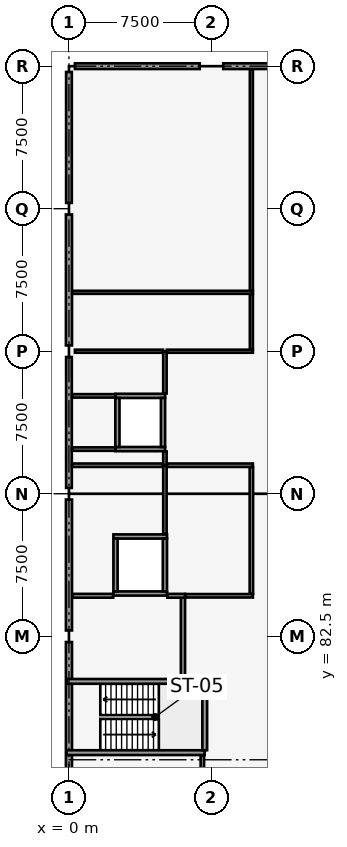
"""IFC4 building model, lengths in metres.
Left out: names, types, materials, properties, quantities, classifications, styles, units other than length and angle.
Written with IfcOpenShell. Run it as: python <this file> out.ifc"""

import sys

from ifc_helpers import new_model, si_unit, direction, frame, frame_2d, origin, origin_2d, place, context, subcontext, project, spatial, rectangle, extrude, element, fill, save


model = new_model("IFC4")
c1 = context("Model", 3, precision=1e-05, world=origin(), true_north=direction((0.0, 1.0)))
c2 = subcontext(c1, "Body", "Model", "MODEL_VIEW")
j1 = project(units=[si_unit("LENGTHUNIT", "METRE"), si_unit("PLANEANGLEUNIT", "RADIAN")], contexts=[c1])
p1 = place(None, origin())
s1 = spatial("IfcSite", under=j1, at=p1, CompositionType="ELEMENT")
p2 = place(p1, origin())
s2 = spatial("IfcBuilding", under=s1, at=p2, CompositionType="ELEMENT")
p3 = place(p2, frame((0.0, 0.0, 9.0)))
s3 = spatial("IfcBuildingStorey", under=s2, at=p3, CompositionType="ELEMENT", Elevation=9.0)
for number, where, z_axis, x_axis in (
    (1, (0.0, 82.5, 0.0), (0.0, 0.0, 1.0), (1.0, 0.0, 0.0)),
    (2, (0.0, 90.0, 0.0), (0.0, 0.0, 1.0), (1.0, 0.0, 0.0)),
    (3, (0.0, 97.5, 0.0), (0.0, 0.0, 1.0), (1.0, 0.0, 0.0)),
    (4, (0.0, 105.0, 0.0), (0.0, 0.0, 1.0), (1.0, 0.0, 0.0)),
    (5, (0.0, 112.5, 0.0), (0.0, 0.0, 1.0), (1.0, 0.0, 0.0)),
):
    element("IfcColumn", number, at=place(p3, frame(where, z_axis=z_axis, x_axis=x_axis)), inside=s3, PredefinedType="COLUMN", context=c2, shape_type="SweptSolid", body=[
        extrude(rectangle(XDim=0.6, YDim=0.6, at=origin_2d()), origin(), (0.0, 0.0, 1.0), 4.2),
    ])
p4 = place(p3, frame((0.315, 112.5, 0.0), z_axis=(0.0, 0.0, 1.0), x_axis=(1.0, 0.0, 0.0)))
e6 = element("IfcWall", 6, at=p4, inside=s3, PredefinedType="SOLIDWALL", context=c2, shape_type="SweptSolid", body=[
    extrude(rectangle(XDim=6.565, YDim=0.3, at=frame_2d((3.282, 0.0))), origin(), (0.0, 0.0, 1.0), 2.87),
])
p5 = place(p4, frame((2.585, 0.0, 0.6)))
e7 = element("IfcOpeningElement", 7, at=p5, cuts=e6, PredefinedType="OPENING", context=c2, shape_type="SweptSolid", body=[
    extrude(rectangle(XDim=1.7, YDim=1.8, at=frame_2d((0.85, 0.9))), frame((0.0, 0.16, 0.0), z_axis=(0.0, -1.0, 0.0), x_axis=(1.0, 0.0, 0.0)), (0.0, 0.0, 1.0), 0.32),
])
p6 = place(p3, frame((8.12, 112.5, 0.0), z_axis=(0.0, 0.0, 1.0), x_axis=(1.0, 0.0, 0.0)))
e8 = element("IfcWall", 8, at=p6, inside=s3, PredefinedType="SOLIDWALL", context=c2, shape_type="SweptSolid", body=[
    extrude(rectangle(XDim=6.565, YDim=0.3, at=frame_2d((3.282, 0.0))), origin(), (0.0, 0.0, 1.0), 2.87),
])
p7 = place(p6, frame((2.205, 0.0, 0.6)))
e9 = element("IfcOpeningElement", 9, at=p7, cuts=e8, PredefinedType="OPENING", context=c2, shape_type="SweptSolid", body=[
    extrude(rectangle(XDim=1.85, YDim=1.8, at=frame_2d((0.925, 0.9))), frame((0.0, 0.16, 0.0), z_axis=(0.0, -1.0, 0.0), x_axis=(1.0, 0.0, 0.0)), (0.0, 0.0, 1.0), 0.32),
])
for number, where, z_axis, x_axis in (
    (10, (0.0, 75.305, 0.0), (0.0, 0.0, 1.0), (0.0, 1.0, 0.0)),
    (11, (0.0, 82.805, 0.0), (0.0, 0.0, 1.0), (0.0, 1.0, 0.0)),
):
    element("IfcWall", number, at=place(p3, frame(where, z_axis=z_axis, x_axis=x_axis)), inside=s3, PredefinedType="SOLIDWALL", context=c2, shape_type="SweptSolid", body=[
        extrude(rectangle(XDim=6.89, YDim=0.32, at=frame_2d((3.445, 0.0))), origin(), (0.0, 0.0, 1.0), 2.87),
    ])
p8 = place(p3, frame((0.0, 90.305, 0.0), z_axis=(0.0, 0.0, 1.0), x_axis=(0.0, 1.0, 0.0)))
e12 = element("IfcWall", 12, at=p8, inside=s3, PredefinedType="SOLIDWALL", context=c2, shape_type="SweptSolid", body=[
    extrude(rectangle(XDim=6.89, YDim=0.3, at=frame_2d((3.445, 0.0))), origin(), (0.0, 0.0, 1.0), 2.87),
])
p9 = place(p8, frame((2.87, 0.0, 0.6)))
e13 = element("IfcOpeningElement", 13, at=p9, cuts=e12, PredefinedType="OPENING", context=c2, shape_type="SweptSolid", body=[
    extrude(rectangle(XDim=1.15, YDim=1.3, at=frame_2d((0.575, 0.65))), frame((0.0, 0.16, 0.0), z_axis=(0.0, -1.0, 0.0), x_axis=(1.0, 0.0, 0.0)), (0.0, 0.0, 1.0), 0.32),
])
p10 = place(p3, frame((0.0, 97.805, 0.0), z_axis=(0.0, 0.0, 1.0), x_axis=(0.0, 1.0, 0.0)))
e14 = element("IfcWall", 14, at=p10, inside=s3, PredefinedType="SOLIDWALL", context=c2, shape_type="SweptSolid", body=[
    extrude(rectangle(XDim=6.89, YDim=0.32, at=frame_2d((3.445, 0.0))), origin(), (0.0, 0.0, 1.0), 2.87),
])
p11 = place(p3, frame((0.0, 105.305, 0.0), z_axis=(0.0, 0.0, 1.0), x_axis=(0.0, 1.0, 0.0)))
e15 = element("IfcWall", 15, at=p11, inside=s3, PredefinedType="SOLIDWALL", context=c2, shape_type="SweptSolid", body=[
    extrude(rectangle(XDim=6.89, YDim=0.3, at=frame_2d((3.445, 0.0))), origin(), (0.0, 0.0, 1.0), 2.87),
])
p12 = place(p11, frame((1.155, 0.0, 0.6)))
e16 = element("IfcOpeningElement", 16, at=p12, cuts=e15, PredefinedType="OPENING", context=c2, shape_type="SweptSolid", body=[
    extrude(rectangle(XDim=1.45, YDim=1.3, at=frame_2d((0.725, 0.65))), frame((0.0, 0.16, 0.0), z_axis=(0.0, -1.0, 0.0), x_axis=(1.0, 0.0, 0.0)), (0.0, 0.0, 1.0), 0.32),
])
p13 = place(p11, frame((4.41, 0.0, 0.6)))
e17 = element("IfcOpeningElement", 17, at=p13, cuts=e15, PredefinedType="OPENING", context=c2, shape_type="SweptSolid", body=[
    extrude(rectangle(XDim=1.2, YDim=1.2, at=frame_2d((0.6, 0.6))), frame((0.0, 0.16, 0.0), z_axis=(0.0, -1.0, 0.0), x_axis=(1.0, 0.0, 0.0)), (0.0, 0.0, 1.0), 0.32),
])
p14 = place(p3, frame((-0.12, 76.375, 0.0), z_axis=(0.0, 0.0, 1.0), x_axis=(1.0, 0.0, 0.0)))
e18 = element("IfcWall", 18, at=p14, inside=s3, PredefinedType="SOLIDWALL", context=c2, shape_type="SweptSolid", body=[
    extrude(rectangle(XDim=7.26, YDim=0.25, at=frame_2d((3.63, 0.0))), origin(), (0.0, 0.0, 1.0), 3.92),
])
p15 = place(p3, frame((-0.12, 80.125, 0.0), z_axis=(0.0, 0.0, 1.0), x_axis=(1.0, 0.0, 0.0)))
e19 = element("IfcWall", 19, at=p15, inside=s3, PredefinedType="SOLIDWALL", context=c2, shape_type="SweptSolid", body=[
    extrude(rectangle(XDim=7.26, YDim=0.25, at=frame_2d((3.63, 0.0))), origin(), (0.0, 0.0, 1.0), 3.92),
])
p16 = place(p15, frame((0.45, 0.0, 0.0)))
e20 = element("IfcOpeningElement", 20, at=p16, cuts=e19, PredefinedType="OPENING", context=c2, shape_type="SweptSolid", body=[
    extrude(rectangle(XDim=1.1, YDim=2.15, at=frame_2d((0.55, 1.075))), frame((0.0, 0.135, 0.0), z_axis=(0.0, -1.0, 0.0), x_axis=(1.0, 0.0, 0.0)), (0.0, 0.0, 1.0), 0.27),
])
p17 = place(p3, frame((7.145, 76.5, 0.0), z_axis=(0.0, 0.0, 1.0), x_axis=(0.0, 1.0, 0.0)))
e21 = element("IfcWall", 21, at=p17, inside=s3, PredefinedType="SOLIDWALL", context=c2, shape_type="SweptSolid", body=[
    extrude(rectangle(XDim=3.5, YDim=0.25, at=frame_2d((1.75, 0.0))), origin(), (0.0, 0.0, 1.0), 3.92),
])
for number, where, z_axis, x_axis in (
    (22, (2.44, 92.35, 0.0), (0.0, 0.0, 1.0), (1.0, 0.0, 0.0)),
    (23, (2.44, 95.15, 0.0), (0.0, 0.0, 1.0), (1.0, 0.0, 0.0)),
):
    element("IfcWall", number, at=place(p3, frame(where, z_axis=z_axis, x_axis=x_axis)), inside=s3, PredefinedType="SOLIDWALL", context=c2, shape_type="SweptSolid", body=[
        extrude(rectangle(XDim=2.62, YDim=0.22, at=frame_2d((1.31, 0.0))), origin(), (0.0, 0.0, 1.0), 3.92),
    ])
p18 = place(p3, frame((2.55, 92.46, 0.0), z_axis=(0.0, 0.0, 1.0), x_axis=(0.0, 1.0, 0.0)))
e24 = element("IfcWall", 24, at=p18, inside=s3, PredefinedType="SOLIDWALL", context=c2, shape_type="SweptSolid", body=[
    extrude(rectangle(XDim=2.58, YDim=0.22, at=frame_2d((1.29, 0.0))), origin(), (0.0, 0.0, 1.0), 3.92),
])
p19 = place(p3, frame((4.95, 92.46, 0.0), z_axis=(0.0, 0.0, 1.0), x_axis=(0.0, 1.0, 0.0)))
e25 = element("IfcWall", 25, at=p19, inside=s3, PredefinedType="SOLIDWALL", context=c2, shape_type="SweptSolid", body=[
    extrude(rectangle(XDim=2.58, YDim=0.22, at=frame_2d((1.29, 0.0))), origin(), (0.0, 0.0, 1.0), 3.92),
])
p20 = place(p19, frame((0.79, 0.0, 0.0)))
e26 = element("IfcOpeningElement", 26, at=p20, cuts=e25, PredefinedType="OPENING", context=c2, shape_type="SweptSolid", body=[
    extrude(rectangle(XDim=1.0, YDim=2.15, at=frame_2d((0.5, 1.075))), frame((0.0, 0.12, 0.0), z_axis=(0.0, -1.0, 0.0), x_axis=(1.0, 0.0, 0.0)), (0.0, 0.0, 1.0), 0.24),
])
p21 = place(p3, frame((2.34, 84.75, 0.0), z_axis=(0.0, 0.0, 1.0), x_axis=(1.0, 0.0, 0.0)))
e27 = element("IfcWall", 27, at=p21, inside=s3, PredefinedType="SOLIDWALL", context=c2, shape_type="SweptSolid", body=[
    extrude(rectangle(XDim=2.82, YDim=0.22, at=frame_2d((1.41, 0.0))), origin(), (0.0, 0.0, 1.0), 3.92),
])
p22 = place(p21, frame((0.86, 0.0, 0.0)))
e28 = element("IfcOpeningElement", 28, at=p22, cuts=e27, PredefinedType="OPENING", context=c2, shape_type="SweptSolid", body=[
    extrude(rectangle(XDim=1.1, YDim=2.15, at=frame_2d((0.55, 1.075))), frame((0.0, 0.12, 0.0), z_axis=(0.0, -1.0, 0.0), x_axis=(1.0, 0.0, 0.0)), (0.0, 0.0, 1.0), 0.24),
])
p23 = place(p3, frame((2.34, 87.75, 0.0), z_axis=(0.0, 0.0, 1.0), x_axis=(1.0, 0.0, 0.0)))
e29 = element("IfcWall", 29, at=p23, inside=s3, PredefinedType="SOLIDWALL", context=c2, shape_type="SweptSolid", body=[
    extrude(rectangle(XDim=2.82, YDim=0.22, at=frame_2d((1.41, 0.0))), origin(), (0.0, 0.0, 1.0), 3.92),
])
for number, where, z_axis, x_axis in (
    (30, (2.45, 84.86, 0.0), (0.0, 0.0, 1.0), (0.0, 1.0, 0.0)),
    (31, (5.05, 84.86, 0.0), (0.0, 0.0, 1.0), (0.0, 1.0, 0.0)),
):
    element("IfcWall", number, at=place(p3, frame(where, z_axis=z_axis, x_axis=x_axis)), inside=s3, PredefinedType="SOLIDWALL", context=c2, shape_type="SweptSolid", body=[
        extrude(rectangle(XDim=2.78, YDim=0.22, at=frame_2d((1.39, 0.0))), origin(), (0.0, 0.0, 1.0), 3.92),
    ])
p24 = place(p3, frame((6.0, 80.26, 0.0), z_axis=(0.0, 0.0, 1.0), x_axis=(0.0, 1.0, 0.0)))
e32 = element("IfcWall", 32, at=p24, inside=s3, PredefinedType="SOLIDWALL", context=c2, shape_type="SweptSolid", body=[
    extrude(rectangle(XDim=4.37, YDim=0.22, at=frame_2d((2.185, 0.0))), origin(), (0.0, 0.0, 1.0), 3.92),
])
p25 = place(p24, frame((0.45, 0.0, 0.0)))
e33 = element("IfcOpeningElement", 33, at=p25, cuts=e32, PredefinedType="OPENING", context=c2, shape_type="SweptSolid", body=[
    extrude(rectangle(XDim=1.1, YDim=2.15, at=frame_2d((0.55, 1.075))), frame((0.0, 0.12, 0.0), z_axis=(0.0, -1.0, 0.0), x_axis=(1.0, 0.0, 0.0)), (0.0, 0.0, 1.0), 0.24),
])
p26 = place(p3, frame((0.18, 84.63, 0.0), z_axis=(0.0, 0.0, 1.0), x_axis=(1.0, 0.0, 0.0)))
e34 = element("IfcWall", 34, at=p26, inside=s3, PredefinedType="PARTITIONING", context=c2, shape_type="SweptSolid", body=[
    extrude(rectangle(XDim=2.145, YDim=0.2, at=frame_2d((1.073, 0.0))), origin(), (0.0, 0.0, 1.0), 3.28),
])
p27 = place(p3, frame((5.175, 84.63, 0.0), z_axis=(0.0, 0.0, 1.0), x_axis=(1.0, 0.0, 0.0)))
e35 = element("IfcWall", 35, at=p27, inside=s3, PredefinedType="PARTITIONING", context=c2, shape_type="SweptSolid", body=[
    extrude(rectangle(XDim=0.935, YDim=0.2, at=frame_2d((0.468, 0.0))), origin(), (0.0, 0.0, 1.0), 3.33),
])
p28 = place(p3, frame((7.02, 75.0, 0.0), z_axis=(0.0, 0.0, 1.0), x_axis=(0.0, 1.0, 0.0)))
e36 = element("IfcWall", 36, at=p28, inside=s3, PredefinedType="PARTITIONING", context=c2, shape_type="SweptSolid", body=[
    extrude(rectangle(XDim=1.236, YDim=0.18, at=frame_2d((0.618, 0.0))), origin(), (0.0, 0.0, 1.0), 2.87),
])
p29 = place(p3, frame((5.05, 87.874, 0.0), z_axis=(0.0, 0.0, 1.0), x_axis=(0.0, 1.0, 0.0)))
e37 = element("IfcWall", 37, at=p29, inside=s3, PredefinedType="PARTITIONING", context=c2, shape_type="SweptSolid", body=[
    extrude(rectangle(XDim=3.626, YDim=0.18, at=frame_2d((1.813, 0.0))), origin(), (0.0, 0.0, 1.0), 2.87),
])
p30 = place(p3, frame((6.124, 84.63, 0.0), z_axis=(0.0, 0.0, 1.0), x_axis=(1.0, 0.0, 0.0)))
e38 = element("IfcWall", 38, at=p30, inside=s3, PredefinedType="PARTITIONING", context=c2, shape_type="SweptSolid", body=[
    extrude(rectangle(XDim=3.556, YDim=0.18, at=frame_2d((1.778, 0.0))), origin(), (0.0, 0.0, 1.0), 3.27),
])
p31 = place(p3, frame((0.164, 91.5, 0.0), z_axis=(0.0, 0.0, 1.0), x_axis=(1.0, 0.0, 0.0)))
e39 = element("IfcWall", 39, at=p31, inside=s3, PredefinedType="PARTITIONING", context=c2, shape_type="SweptSolid", body=[
    extrude(rectangle(XDim=4.782, YDim=0.18, at=frame_2d((2.391, 0.0))), origin(), (0.0, 0.0, 1.0), 3.12),
])
p32 = place(p3, frame((5.154, 91.5, 0.0), z_axis=(0.0, 0.0, 1.0), x_axis=(1.0, 0.0, 0.0)))
e40 = element("IfcWall", 40, at=p32, inside=s3, PredefinedType="PARTITIONING", context=c2, shape_type="SweptSolid", body=[
    extrude(rectangle(XDim=4.526, YDim=0.18, at=frame_2d((2.263, 0.0))), origin(), (0.0, 0.0, 1.0), 3.27),
])
p33 = place(p3, frame((9.6, 84.734, 0.0), z_axis=(0.0, 0.0, 1.0), x_axis=(0.0, 1.0, 0.0)))
e41 = element("IfcWall", 41, at=p33, inside=s3, PredefinedType="PARTITIONING", context=c2, shape_type="SweptSolid", body=[
    extrude(rectangle(XDim=6.662, YDim=0.18, at=frame_2d((3.331, 0.0))), origin(), (0.0, 0.0, 1.0), 2.87),
])
p34 = place(p33, frame((2.241, 0.0, 0.0)))
e42 = element("IfcOpeningElement", 42, at=p34, cuts=e41, PredefinedType="OPENING", context=c2, shape_type="SweptSolid", body=[
    extrude(rectangle(XDim=1.05, YDim=2.12, at=frame_2d((0.525, 1.06))), frame((0.0, 0.1, 0.0), z_axis=(0.0, -1.0, 0.0), x_axis=(1.0, 0.0, 0.0)), (0.0, 0.0, 1.0), 0.2),
])
for number, where, z_axis, x_axis in (
    (43, (0.164, 92.35, 0.0), (0.0, 0.0, 1.0), (1.0, 0.0, 0.0)),
    (44, (0.164, 95.15, 0.0), (0.0, 0.0, 1.0), (1.0, 0.0, 0.0)),
):
    element("IfcWall", number, at=place(p3, frame(where, z_axis=z_axis, x_axis=x_axis)), inside=s3, PredefinedType="PARTITIONING", context=c2, shape_type="SweptSolid", body=[
        extrude(rectangle(XDim=2.276, YDim=0.18, at=frame_2d((1.138, 0.0))), origin(), (0.0, 0.0, 1.0), 3.12),
    ])
p35 = place(p3, frame((5.05, 91.5, 0.0), z_axis=(0.0, 0.0, 1.0), x_axis=(0.0, 1.0, 0.0)))
e45 = element("IfcWall", 45, at=p35, inside=s3, PredefinedType="PARTITIONING", context=c2, shape_type="SweptSolid", body=[
    extrude(rectangle(XDim=0.726, YDim=0.18, at=frame_2d((0.363, 0.0))), origin(), (0.0, 0.0, 1.0), 3.27),
])
p36 = place(p3, frame((5.05, 95.274, 0.0), z_axis=(0.0, 0.0, 1.0), x_axis=(0.0, 1.0, 0.0)))
e46 = element("IfcWall", 46, at=p36, inside=s3, PredefinedType="PARTITIONING", context=c2, shape_type="SweptSolid", body=[
    extrude(rectangle(XDim=2.226, YDim=0.18, at=frame_2d((1.113, 0.0))), origin(), (0.0, 0.0, 1.0), 2.87),
])
p37 = place(p3, frame((0.314, 97.5, 0.0), z_axis=(0.0, 0.0, 1.0), x_axis=(1.0, 0.0, 0.0)))
e47 = element("IfcWall", 47, at=p37, inside=s3, PredefinedType="PARTITIONING", context=c2, shape_type="SweptSolid", body=[
    extrude(rectangle(XDim=4.632, YDim=0.16, at=frame_2d((2.316, 0.0))), origin(), (0.0, 0.0, 1.0), 2.87),
])
p38 = place(p3, frame((5.154, 97.5, 0.0), z_axis=(0.0, 0.0, 1.0), x_axis=(1.0, 0.0, 0.0)))
e48 = element("IfcWall", 48, at=p38, inside=s3, PredefinedType="PARTITIONING", context=c2, shape_type="SweptSolid", body=[
    extrude(rectangle(XDim=4.526, YDim=0.16, at=frame_2d((2.263, 0.0))), origin(), (0.0, 0.0, 1.0), 2.87),
])
p39 = place(p3, frame((0.174, 100.6, 0.0), z_axis=(0.0, 0.0, 1.0), x_axis=(1.0, 0.0, 0.0)))
e49 = element("IfcWall", 49, at=p39, inside=s3, PredefinedType="PARTITIONING", context=c2, shape_type="SweptSolid", body=[
    extrude(rectangle(XDim=9.506, YDim=0.16, at=frame_2d((4.753, 0.0))), origin(), (0.0, 0.0, 1.0), 3.12),
])
p40 = place(p3, frame((9.6, 97.594, 0.0), z_axis=(0.0, 0.0, 1.0), x_axis=(0.0, 1.0, 0.0)))
e50 = element("IfcWall", 50, at=p40, inside=s3, PredefinedType="PARTITIONING", context=c2, shape_type="SweptSolid", body=[
    extrude(rectangle(XDim=2.912, YDim=0.16, at=frame_2d((1.456, 0.0))), origin(), (0.0, 0.0, 1.0), 2.87),
])
p41 = place(p40, frame((0.981, 0.0, 0.0)))
e51 = element("IfcOpeningElement", 51, at=p41, cuts=e50, PredefinedType="OPENING", context=c2, shape_type="SweptSolid", body=[
    extrude(rectangle(XDim=0.95, YDim=2.1, at=frame_2d((0.475, 1.05))), frame((0.0, 0.09, 0.0), z_axis=(0.0, -1.0, 0.0), x_axis=(1.0, 0.0, 0.0)), (0.0, 0.0, 1.0), 0.18),
])
p42 = place(p3, frame((9.6, 100.694, 0.0), z_axis=(0.0, 0.0, 1.0), x_axis=(0.0, 1.0, 0.0)))
e52 = element("IfcWall", 52, at=p42, inside=s3, PredefinedType="PARTITIONING", context=c2, shape_type="SweptSolid", body=[
    extrude(rectangle(XDim=11.642, YDim=0.16, at=frame_2d((5.821, 0.0))), origin(), (0.0, 0.0, 1.0), 2.87),
])
p43 = place(p42, frame((5.281, 0.0, 0.0)))
e53 = element("IfcOpeningElement", 53, at=p43, cuts=e52, PredefinedType="OPENING", context=c2, shape_type="SweptSolid", body=[
    extrude(rectangle(XDim=1.05, YDim=2.12, at=frame_2d((0.525, 1.06))), frame((0.0, 0.09, 0.0), z_axis=(0.0, -1.0, 0.0), x_axis=(1.0, 0.0, 0.0)), (0.0, 0.0, 1.0), 0.18),
])
p44 = place(p5, origin())
e54 = element("IfcWindow", 54, at=p44, inside=s3, PartitioningType="SINGLE_PANEL", PredefinedType="WINDOW", context=c2, shape_type="SweptSolid", body=[
    extrude(rectangle(XDim=1.7, YDim=1.8, at=frame_2d((0.85, 0.9))), frame((0.0, 0.03, 0.0), z_axis=(0.0, -1.0, 0.0), x_axis=(1.0, 0.0, 0.0)), (0.0, 0.0, 1.0), 0.06),
])
fill(e7, e54)
p45 = place(p7, origin())
e55 = element("IfcWindow", 55, at=p45, inside=s3, PartitioningType="SINGLE_PANEL", PredefinedType="WINDOW", context=c2, shape_type="SweptSolid", body=[
    extrude(rectangle(XDim=1.85, YDim=1.8, at=frame_2d((0.925, 0.9))), frame((0.0, 0.03, 0.0), z_axis=(0.0, -1.0, 0.0), x_axis=(1.0, 0.0, 0.0)), (0.0, 0.0, 1.0), 0.06),
])
fill(e9, e55)
p46 = place(p9, origin())
e56 = element("IfcWindow", 56, at=p46, inside=s3, PartitioningType="SINGLE_PANEL", PredefinedType="WINDOW", context=c2, shape_type="SweptSolid", body=[
    extrude(rectangle(XDim=1.15, YDim=1.3, at=frame_2d((0.575, 0.65))), frame((0.0, 0.03, 0.0), z_axis=(0.0, -1.0, 0.0), x_axis=(1.0, 0.0, 0.0)), (0.0, 0.0, 1.0), 0.06),
])
fill(e13, e56)
p47 = place(p12, origin())
e57 = element("IfcWindow", 57, at=p47, inside=s3, PartitioningType="SINGLE_PANEL", PredefinedType="WINDOW", context=c2, shape_type="SweptSolid", body=[
    extrude(rectangle(XDim=1.45, YDim=1.3, at=frame_2d((0.725, 0.65))), frame((0.0, 0.03, 0.0), z_axis=(0.0, -1.0, 0.0), x_axis=(1.0, 0.0, 0.0)), (0.0, 0.0, 1.0), 0.06),
])
fill(e16, e57)
p48 = place(p13, origin())
e58 = element("IfcWindow", 58, at=p48, inside=s3, PartitioningType="SINGLE_PANEL", PredefinedType="WINDOW", context=c2, shape_type="SweptSolid", body=[
    extrude(rectangle(XDim=1.2, YDim=1.2, at=frame_2d((0.6, 0.6))), frame((0.0, 0.03, 0.0), z_axis=(0.0, -1.0, 0.0), x_axis=(1.0, 0.0, 0.0)), (0.0, 0.0, 1.0), 0.06),
])
fill(e17, e58)
p49 = place(p16, origin())
e59 = element("IfcDoor", 59, at=p49, inside=s3, OperationType="SINGLE_SWING_RIGHT", PredefinedType="DOOR", context=c2, shape_type="SweptSolid", body=[
    extrude(rectangle(XDim=1.1, YDim=2.15, at=frame_2d((0.55, 1.075))), frame((0.0, 0.025, 0.0), z_axis=(0.0, -1.0, 0.0), x_axis=(1.0, 0.0, 0.0)), (0.0, 0.0, 1.0), 0.05),
])
fill(e20, e59)
p50 = place(p20, origin())
e60 = element("IfcDoor", 60, at=p50, inside=s3, OperationType="SLIDING_TO_LEFT", PredefinedType="DOOR", context=c2, shape_type="SweptSolid", body=[
    extrude(rectangle(XDim=1.0, YDim=2.15, at=frame_2d((0.5, 1.075))), frame((0.0, 0.025, 0.0), z_axis=(0.0, -1.0, 0.0), x_axis=(1.0, 0.0, 0.0)), (0.0, 0.0, 1.0), 0.05),
])
fill(e26, e60)
p51 = place(p22, origin())
e61 = element("IfcDoor", 61, at=p51, inside=s3, OperationType="SLIDING_TO_LEFT", PredefinedType="DOOR", context=c2, shape_type="SweptSolid", body=[
    extrude(rectangle(XDim=1.1, YDim=2.15, at=frame_2d((0.55, 1.075))), frame((0.0, 0.025, 0.0), z_axis=(0.0, -1.0, 0.0), x_axis=(1.0, 0.0, 0.0)), (0.0, 0.0, 1.0), 0.05),
])
fill(e28, e61)
p52 = place(p25, origin())
e62 = element("IfcDoor", 62, at=p52, inside=s3, OperationType="SINGLE_SWING_LEFT", PredefinedType="DOOR", context=c2, shape_type="SweptSolid", body=[
    extrude(rectangle(XDim=1.1, YDim=2.15, at=frame_2d((0.55, 1.075))), frame((0.0, 0.025, 0.0), z_axis=(0.0, -1.0, 0.0), x_axis=(1.0, 0.0, 0.0)), (0.0, 0.0, 1.0), 0.05),
])
fill(e33, e62)
p53 = place(p34, origin())
e63 = element("IfcDoor", 63, at=p53, inside=s3, OperationType="SINGLE_SWING_LEFT", PredefinedType="DOOR", context=c2, shape_type="SweptSolid", body=[
    extrude(rectangle(XDim=1.05, YDim=2.12, at=frame_2d((0.525, 1.06))), frame((0.0, 0.025, 0.0), z_axis=(0.0, -1.0, 0.0), x_axis=(1.0, 0.0, 0.0)), (0.0, 0.0, 1.0), 0.05),
])
fill(e42, e63)
p54 = place(p41, origin())
e64 = element("IfcDoor", 64, at=p54, inside=s3, OperationType="SINGLE_SWING_RIGHT", PredefinedType="DOOR", context=c2, shape_type="SweptSolid", body=[
    extrude(rectangle(XDim=0.95, YDim=2.1, at=frame_2d((0.475, 1.05))), frame((0.0, 0.025, 0.0), z_axis=(0.0, -1.0, 0.0), x_axis=(1.0, 0.0, 0.0)), (0.0, 0.0, 1.0), 0.05),
])
fill(e51, e64)
p55 = place(p43, origin())
e65 = element("IfcDoor", 65, at=p55, inside=s3, OperationType="SINGLE_SWING_LEFT", PredefinedType="DOOR", context=c2, shape_type="SweptSolid", body=[
    extrude(rectangle(XDim=1.05, YDim=2.12, at=frame_2d((0.525, 1.06))), frame((0.0, 0.025, 0.0), z_axis=(0.0, -1.0, 0.0), x_axis=(1.0, 0.0, 0.0)), (0.0, 0.0, 1.0), 0.05),
])
fill(e53, e65)
save(model, sys.argv[1])
